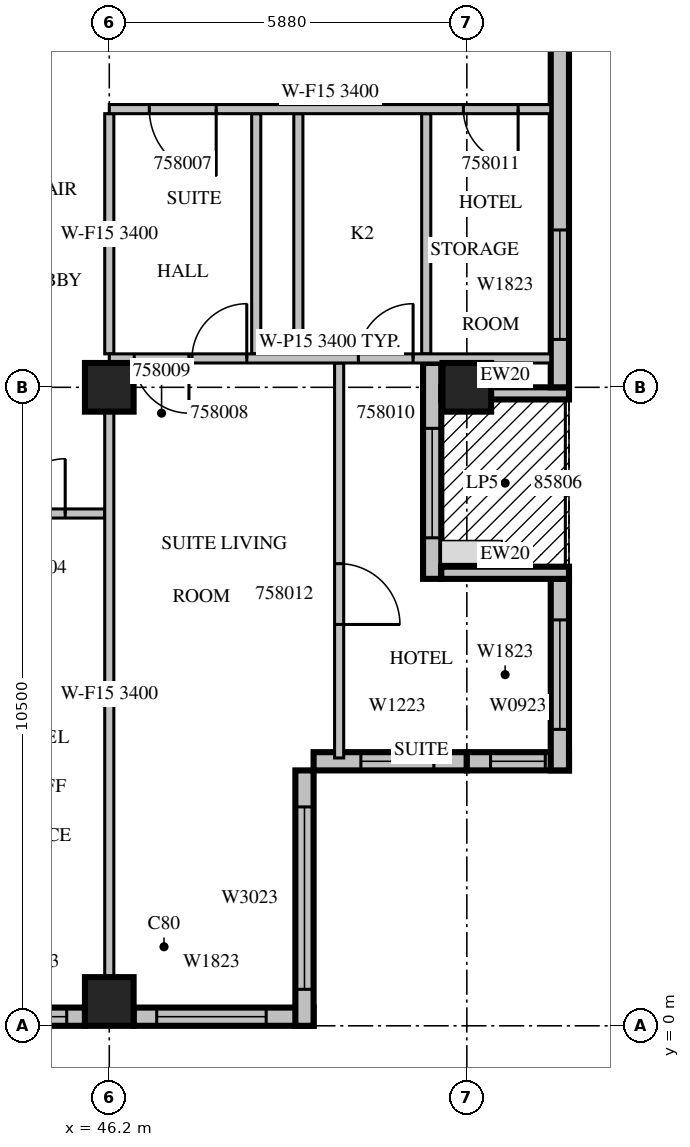
"""IFC4 building model, lengths in metres.
Left out: names, types, materials, properties, quantities, classifications, styles, units other than length and angle.
Written with IfcOpenShell. Run it as: python <this file> out.ifc"""

import sys

from ifc_helpers import new_model, si_unit, direction, frame, frame_2d, origin, origin_2d, place, context, subcontext, project, spatial, rectangle, extrude, source, transform, mapped, element, fill, save


model = new_model("IFC4")
c1 = context("Model", 3, precision=1e-05, world=origin(), true_north=direction((0.0, 1.0)))
c2 = subcontext(c1, "Body", "Model", "MODEL_VIEW")
j1 = project(units=[si_unit("LENGTHUNIT", "METRE"), si_unit("PLANEANGLEUNIT", "RADIAN")], contexts=[c1])
p1 = place(None, origin())
s1 = spatial("IfcSite", under=j1, at=p1, CompositionType="ELEMENT")
p2 = place(p1, origin())
s2 = spatial("IfcBuilding", under=s1, at=p2, CompositionType="ELEMENT")
p3 = place(p2, frame((0.0, 0.0, 253.8)))
s3 = spatial("IfcBuildingStorey", under=s2, at=p3, CompositionType="ELEMENT", Elevation=253.8)
m1 = source(origin(), c2, "Body", "SweptSolid", [
    extrude(rectangle(XDim=0.8, YDim=0.8, at=origin_2d()), origin(), (0.0, 0.0, 1.0), 3.8),
])
for number, where, z_axis, x_axis in (
    (1, (46.2, 0.4, 0.0), (0.0, 0.0, 1.0), (1.0, 0.0, 0.0)),
    (2, (46.2, 10.5, 0.0), (0.0, 0.0, 1.0), (1.0, 0.0, 0.0)),
    (3, (52.08, 10.5, 0.0), (0.0, 0.0, 1.0), (1.0, 0.0, 0.0)),
):
    element("IfcColumn", number, at=place(p3, frame(where, z_axis=z_axis, x_axis=x_axis)), inside=s3, PredefinedType="COLUMN", context=c2, shape_type="MappedRepresentation", body=[
        mapped(m1, transform((0.0, 0.0, 0.0), scale=1.0)),
    ])
m2 = source(origin(), c2, "Body", "SweptSolid", [
    extrude(rectangle(XDim=1.8, YDim=0.3, at=frame_2d((0.9, 0.0))), origin(), (0.0, 0.0, 1.0), 3.4),
])
p4 = place(p3, frame((44.0, 0.15, 0.0), z_axis=(0.0, 0.0, 1.0), x_axis=(1.0, 0.0, 0.0)))
e4 = element("IfcWall", 4, at=p4, inside=s3, PredefinedType="STANDARD", context=c2, shape_type="MappedRepresentation", body=[
    mapped(m2, transform((0.0, 0.0, 0.0), scale=1.0)),
])
m3 = source(origin(), c2, "Body", "SweptSolid", [
    extrude(rectangle(XDim=1.2, YDim=2.3, at=frame_2d((0.6, 1.15))), frame((0.0, 0.16, 0.0), z_axis=(0.0, -1.0, 0.0), x_axis=(1.0, 0.0, 0.0)), (0.0, 0.0, 1.0), 0.32),
])
p5 = place(p4, frame((0.3, 0.0, 0.6)))
e5 = element("IfcOpeningElement", 5, at=p5, cuts=e4, PredefinedType="OPENING", context=c2, shape_type="MappedRepresentation", body=[
    mapped(m3, transform((0.0, 0.0, 0.0), scale=1.0)),
])
m4 = source(origin(), c2, "Body", "SweptSolid", [
    extrude(rectangle(XDim=2.96, YDim=0.3, at=frame_2d((1.48, 0.0))), origin(), (0.0, 0.0, 1.0), 3.4),
])
p6 = place(p3, frame((46.6, 0.15, 0.0), z_axis=(0.0, 0.0, 1.0), x_axis=(1.0, 0.0, 0.0)))
e6 = element("IfcWall", 6, at=p6, inside=s3, PredefinedType="STANDARD", context=c2, shape_type="MappedRepresentation", body=[
    mapped(m4, transform((0.0, 0.0, 0.0), scale=1.0)),
])
m5 = source(origin(), c2, "Body", "SweptSolid", [
    extrude(rectangle(XDim=1.8, YDim=2.3, at=frame_2d((0.9, 1.15))), frame((0.0, 0.16, 0.0), z_axis=(0.0, -1.0, 0.0), x_axis=(1.0, 0.0, 0.0)), (0.0, 0.0, 1.0), 0.32),
])
p7 = place(p6, frame((0.38, 0.0, 0.6)))
e7 = element("IfcOpeningElement", 7, at=p7, cuts=e6, PredefinedType="OPENING", context=c2, shape_type="MappedRepresentation", body=[
    mapped(m5, transform((0.0, 0.0, 0.0), scale=1.0)),
])
m6 = source(origin(), c2, "Body", "SweptSolid", [
    extrude(rectangle(XDim=4.2, YDim=0.3, at=frame_2d((2.1, 0.0))), origin(), (0.0, 0.0, 1.0), 3.4),
])
p8 = place(p3, frame((49.41, 0.0, 0.0), z_axis=(0.0, 0.0, 1.0), x_axis=(0.0, 1.0, 0.0)))
e8 = element("IfcWall", 8, at=p8, inside=s3, PredefinedType="STANDARD", context=c2, shape_type="MappedRepresentation", body=[
    mapped(m6, transform((0.0, 0.0, 0.0), scale=1.0)),
])
m7 = source(origin(), c2, "Body", "SweptSolid", [
    extrude(rectangle(XDim=3.0, YDim=2.3, at=frame_2d((1.5, 1.15))), frame((0.0, 0.16, 0.0), z_axis=(0.0, -1.0, 0.0), x_axis=(1.0, 0.0, 0.0)), (0.0, 0.0, 1.0), 0.32),
])
p9 = place(p8, frame((0.6, 0.0, 0.6)))
e9 = element("IfcOpeningElement", 9, at=p9, cuts=e8, PredefinedType="OPENING", context=c2, shape_type="MappedRepresentation", body=[
    mapped(m7, transform((0.0, 0.0, 0.0), scale=1.0)),
])
m8 = source(origin(), c2, "Body", "SweptSolid", [
    extrude(rectangle(XDim=2.52, YDim=0.3, at=frame_2d((1.26, 0.0))), origin(), (0.0, 0.0, 1.0), 3.4),
])
p10 = place(p3, frame((49.56, 4.35, 0.0), z_axis=(0.0, 0.0, 1.0), x_axis=(1.0, 0.0, 0.0)))
e10 = element("IfcWall", 10, at=p10, inside=s3, PredefinedType="STANDARD", context=c2, shape_type="MappedRepresentation", body=[
    mapped(m8, transform((0.0, 0.0, 0.0), scale=1.0)),
])
p11 = place(p10, frame((0.777, 0.0, 0.6)))
e11 = element("IfcOpeningElement", 11, at=p11, cuts=e10, PredefinedType="OPENING", context=c2, shape_type="MappedRepresentation", body=[
    mapped(m3, transform((0.0, 0.0, 0.0), scale=1.0)),
])
m9 = source(origin(), c2, "Body", "SweptSolid", [
    extrude(rectangle(XDim=1.68, YDim=0.3, at=frame_2d((0.84, 0.0))), origin(), (0.0, 0.0, 1.0), 3.4),
])
p12 = place(p3, frame((52.08, 4.35, 0.0), z_axis=(0.0, 0.0, 1.0), x_axis=(1.0, 0.0, 0.0)))
e12 = element("IfcWall", 12, at=p12, inside=s3, PredefinedType="STANDARD", context=c2, shape_type="MappedRepresentation", body=[
    mapped(m9, transform((0.0, 0.0, 0.0), scale=1.0)),
])
m10 = source(origin(), c2, "Body", "SweptSolid", [
    extrude(rectangle(XDim=0.9, YDim=2.3, at=frame_2d((0.45, 1.15))), frame((0.0, 0.16, 0.0), z_axis=(0.0, -1.0, 0.0), x_axis=(1.0, 0.0, 0.0)), (0.0, 0.0, 1.0), 0.32),
])
p13 = place(p12, frame((0.39, 0.0, 0.6)))
e13 = element("IfcOpeningElement", 13, at=p13, cuts=e12, PredefinedType="OPENING", context=c2, shape_type="MappedRepresentation", body=[
    mapped(m10, transform((0.0, 0.0, 0.0), scale=1.0)),
])
m11 = source(origin(), c2, "Body", "SweptSolid", [
    extrude(rectangle(XDim=3.15, YDim=0.3, at=frame_2d((1.575, 0.0))), origin(), (0.0, 0.0, 1.0), 3.4),
])
p14 = place(p3, frame((53.61, 4.2, 0.0), z_axis=(0.0, 0.0, 1.0), x_axis=(0.0, 1.0, 0.0)))
e14 = element("IfcWall", 14, at=p14, inside=s3, PredefinedType="STANDARD", context=c2, shape_type="MappedRepresentation", body=[
    mapped(m11, transform((0.0, 0.0, 0.0), scale=1.0)),
])
p15 = place(p14, frame((0.675, 0.0, 0.6)))
e15 = element("IfcOpeningElement", 15, at=p15, cuts=e14, PredefinedType="OPENING", context=c2, shape_type="MappedRepresentation", body=[
    mapped(m5, transform((0.0, 0.0, 0.0), scale=1.0)),
])
m12 = source(origin(), c2, "Body", "SweptSolid", [
    extrude(rectangle(XDim=3.55, YDim=0.3, at=frame_2d((1.775, 0.0))), origin(), (0.0, 0.0, 1.0), 3.4),
])
p16 = place(p3, frame((51.51, 7.35, 0.0), z_axis=(0.0, 0.0, 1.0), x_axis=(0.0, 1.0, 0.0)))
e16 = element("IfcWall", 16, at=p16, inside=s3, PredefinedType="STANDARD", context=c2, shape_type="MappedRepresentation", body=[
    mapped(m12, transform((0.0, 0.0, 0.0), scale=1.0)),
])
m13 = source(origin(), c2, "Body", "SweptSolid", [
    extrude(rectangle(XDim=1.8, YDim=2.4, at=frame_2d((0.9, 1.2))), frame((0.0, 0.16, 0.0), z_axis=(0.0, -1.0, 0.0), x_axis=(1.0, 0.0, 0.0)), (0.0, 0.0, 1.0), 0.32),
])
p17 = place(p16, frame((0.675, 0.0, 0.0)))
e17 = element("IfcOpeningElement", 17, at=p17, cuts=e16, PredefinedType="OPENING", context=c2, shape_type="MappedRepresentation", body=[
    mapped(m13, transform((0.0, 0.0, 0.0), scale=1.0)),
])
m14 = source(origin(), c2, "Body", "SweptSolid", [
    extrude(rectangle(XDim=2.1, YDim=0.2, at=frame_2d((1.05, 0.0))), origin(), (0.0, 0.0, 1.0), 3.4),
])
for number, where, z_axis, x_axis in (
    (18, (53.76, 7.45, 0.0), (0.0, 0.0, 1.0), (-1.0, 0.0, 0.0)),
    (19, (53.76, 10.4, 0.0), (0.0, 0.0, 1.0), (-1.0, 0.0, 0.0)),
):
    element("IfcWall", number, at=place(p3, frame(where, z_axis=z_axis, x_axis=x_axis)), inside=s3, PredefinedType="STANDARD", context=c2, shape_type="MappedRepresentation", body=[
        mapped(m14, transform((0.0, 0.0, 0.0), scale=1.0)),
    ])
m15 = source(origin(), c2, "Body", "SweptSolid", [
    extrude(rectangle(XDim=6.75, YDim=0.3, at=frame_2d((3.375, 0.0))), origin(), (0.0, 0.0, 1.0), 3.4),
])
p18 = place(p3, frame((53.61, 10.5, 0.0), z_axis=(0.0, 0.0, 1.0), x_axis=(0.0, 1.0, 0.0)))
e20 = element("IfcWall", 20, at=p18, inside=s3, PredefinedType="STANDARD", context=c2, shape_type="MappedRepresentation", body=[
    mapped(m15, transform((0.0, 0.0, 0.0), scale=1.0)),
])
p19 = place(p18, frame((0.787, 0.0, 0.6)))
e21 = element("IfcOpeningElement", 21, at=p19, cuts=e20, PredefinedType="OPENING", context=c2, shape_type="MappedRepresentation", body=[
    mapped(m5, transform((0.0, 0.0, 0.0), scale=1.0)),
])
m16 = source(origin(), c2, "Body", "SweptSolid", [
    extrude(rectangle(XDim=2.2, YDim=0.15, at=frame_2d((1.1, 0.0))), origin(), (0.0, 0.0, 1.0), 3.4),
])
p20 = place(p3, frame((46.125, 8.425, 0.0), z_axis=(0.0, 0.0, 1.0), x_axis=(-1.0, 0.0, 0.0)))
e22 = element("IfcWall", 22, at=p20, inside=s3, PredefinedType="PARTITIONING", context=c2, shape_type="MappedRepresentation", body=[
    mapped(m16, transform((0.0, 0.0, 0.0), scale=1.0)),
])
m17 = source(origin(), c2, "Body", "SweptSolid", [
    extrude(rectangle(XDim=0.9, YDim=2.1, at=frame_2d((0.45, 1.05))), frame((0.0, 0.085, 0.0), z_axis=(0.0, -1.0, 0.0), x_axis=(1.0, 0.0, 0.0)), (0.0, 0.0, 1.0), 0.17),
])
p21 = place(p20, frame((0.65, 0.0, 0.0)))
e23 = element("IfcOpeningElement", 23, at=p21, cuts=e22, PredefinedType="OPENING", context=c2, shape_type="MappedRepresentation", body=[
    mapped(m17, transform((0.0, 0.0, 0.0), scale=1.0)),
])
p22 = place(p3, frame((49.98, 4.405, 0.0), z_axis=(0.0, 0.0, 1.0), x_axis=(0.0, 1.0, 0.0)))
e24 = element("IfcWall", 24, at=p22, inside=s3, PredefinedType="PARTITIONING", context=c2, shape_type="SweptSolid", body=[
    extrude(rectangle(XDim=6.495, YDim=0.15, at=frame_2d((3.248, 0.0))), origin(), (0.0, 0.0, 1.0), 3.4),
])
m18 = source(origin(), c2, "Body", "SweptSolid", [
    extrude(rectangle(XDim=1.0, YDim=2.1, at=frame_2d((0.5, 1.05))), frame((0.0, 0.085, 0.0), z_axis=(0.0, -1.0, 0.0), x_axis=(1.0, 0.0, 0.0)), (0.0, 0.0, 1.0), 0.17),
])
p23 = place(p22, frame((2.195, 0.0, 0.0)))
e25 = element("IfcOpeningElement", 25, at=p23, cuts=e24, PredefinedType="OPENING", context=c2, shape_type="MappedRepresentation", body=[
    mapped(m18, transform((0.0, 0.0, 0.0), scale=1.0)),
])
m19 = source(origin(), c2, "Body", "SweptSolid", [
    extrude(rectangle(XDim=3.95, YDim=0.15, at=frame_2d((1.975, 0.0))), origin(), (0.0, 0.0, 1.0), 3.4),
])
for number, where, z_axis, x_axis in (
    (26, (48.617, 11.05, 0.0), (0.0, 0.0, 1.0), (0.0, 1.0, 0.0)),
    (27, (49.309, 11.05, 0.0), (0.0, 0.0, 1.0), (0.0, 1.0, 0.0)),
    (28, (51.412, 11.05, 0.0), (0.0, 0.0, 1.0), (0.0, 1.0, 0.0)),
):
    element("IfcWall", number, at=place(p3, frame(where, z_axis=z_axis, x_axis=x_axis)), inside=s3, PredefinedType="PARTITIONING", context=c2, shape_type="MappedRepresentation", body=[
        mapped(m19, transform((0.0, 0.0, 0.0), scale=1.0)),
    ])
m20 = source(origin(), c2, "Body", "SweptSolid", [
    extrude(rectangle(XDim=9.302, YDim=0.15, at=frame_2d((4.651, 0.0))), origin(), (0.0, 0.0, 1.0), 3.4),
])
p24 = place(p3, frame((46.2, 0.799, 0.0), z_axis=(0.0, 0.0, 1.0), x_axis=(0.0, 1.0, 0.0)))
e29 = element("IfcWall", 29, at=p24, inside=s3, PredefinedType="PARTITIONING", context=c2, shape_type="MappedRepresentation", body=[
    mapped(m20, transform((0.0, 0.0, 0.0), scale=1.0)),
])
p25 = place(p3, frame((46.2, 11.05, 0.0), z_axis=(0.0, 0.0, 1.0), x_axis=(0.0, 1.0, 0.0)))
e30 = element("IfcWall", 30, at=p25, inside=s3, PredefinedType="PARTITIONING", context=c2, shape_type="MappedRepresentation", body=[
    mapped(m19, transform((0.0, 0.0, 0.0), scale=1.0)),
])
m21 = source(origin(), c2, "Body", "SweptSolid", [
    extrude(rectangle(XDim=7.26, YDim=0.15, at=frame_2d((3.63, 0.0))), origin(), (0.0, 0.0, 1.0), 3.4),
])
p26 = place(p3, frame((53.46, 10.975, 0.0), z_axis=(0.0, 0.0, 1.0), x_axis=(-1.0, 0.0, 0.0)))
e31 = element("IfcWall", 31, at=p26, inside=s3, PredefinedType="PARTITIONING", context=c2, shape_type="MappedRepresentation", body=[
    mapped(m21, transform((0.0, 0.0, 0.0), scale=1.0)),
])
p27 = place(p26, frame((4.999, 0.0, 0.0)))
e32 = element("IfcOpeningElement", 32, at=p27, cuts=e31, PredefinedType="OPENING", context=c2, shape_type="MappedRepresentation", body=[
    mapped(m17, transform((0.0, 0.0, 0.0), scale=1.0)),
])
p28 = place(p26, frame((5.95, 0.0, 0.0)))
e33 = element("IfcOpeningElement", 33, at=p28, cuts=e31, PredefinedType="OPENING", context=c2, shape_type="MappedRepresentation", body=[
    mapped(m17, transform((0.0, 0.0, 0.0), scale=1.0)),
])
p29 = place(p26, frame((2.264, 0.0, 0.0)))
e34 = element("IfcOpeningElement", 34, at=p29, cuts=e31, PredefinedType="OPENING", context=c2, shape_type="MappedRepresentation", body=[
    mapped(m17, transform((0.0, 0.0, 0.0), scale=1.0)),
])
p30 = place(p3, frame((53.46, 15.075, 0.0), z_axis=(0.0, 0.0, 1.0), x_axis=(-1.0, 0.0, 0.0)))
e35 = element("IfcWall", 35, at=p30, inside=s3, PredefinedType="PARTITIONING", context=c2, shape_type="MappedRepresentation", body=[
    mapped(m21, transform((0.0, 0.0, 0.0), scale=1.0)),
])
m22 = source(origin(), c2, "Body", "SweptSolid", [
    extrude(rectangle(XDim=1.1, YDim=2.1, at=frame_2d((0.55, 1.05))), frame((0.0, 0.085, 0.0), z_axis=(0.0, -1.0, 0.0), x_axis=(1.0, 0.0, 0.0)), (0.0, 0.0, 1.0), 0.17),
])
p31 = place(p30, frame((5.502, 0.0, 0.0)))
e36 = element("IfcOpeningElement", 36, at=p31, cuts=e35, PredefinedType="OPENING", context=c2, shape_type="MappedRepresentation", body=[
    mapped(m22, transform((0.0, 0.0, 0.0), scale=1.0)),
])
p32 = place(p30, frame((0.536, 0.0, 0.0)))
e37 = element("IfcOpeningElement", 37, at=p32, cuts=e35, PredefinedType="OPENING", context=c2, shape_type="MappedRepresentation", body=[
    mapped(m17, transform((0.0, 0.0, 0.0), scale=1.0)),
])
m23 = source(origin(), c2, "Body", "SweptSolid", [
    extrude(rectangle(XDim=1.2, YDim=2.3, at=frame_2d((0.6, 1.15))), frame((0.0, 0.03, 0.0), z_axis=(0.0, -1.0, 0.0), x_axis=(1.0, 0.0, 0.0)), (0.0, 0.0, 1.0), 0.06),
])
p33 = place(p5, origin())
e38 = element("IfcWindow", 38, at=p33, inside=s3, PartitioningType="SINGLE_PANEL", PredefinedType="WINDOW", context=c2, shape_type="MappedRepresentation", body=[
    mapped(m23, transform((0.0, 0.0, 0.0), scale=1.0)),
])
fill(e5, e38)
m24 = source(origin(), c2, "Body", "SweptSolid", [
    extrude(rectangle(XDim=1.8, YDim=2.3, at=frame_2d((0.9, 1.15))), frame((0.0, 0.03, 0.0), z_axis=(0.0, -1.0, 0.0), x_axis=(1.0, 0.0, 0.0)), (0.0, 0.0, 1.0), 0.06),
])
p34 = place(p7, origin())
e39 = element("IfcWindow", 39, at=p34, inside=s3, PartitioningType="SINGLE_PANEL", PredefinedType="WINDOW", context=c2, shape_type="MappedRepresentation", body=[
    mapped(m24, transform((0.0, 0.0, 0.0), scale=1.0)),
])
fill(e7, e39)
m25 = source(origin(), c2, "Body", "SweptSolid", [
    extrude(rectangle(XDim=3.0, YDim=2.3, at=frame_2d((1.5, 1.15))), frame((0.0, 0.03, 0.0), z_axis=(0.0, -1.0, 0.0), x_axis=(1.0, 0.0, 0.0)), (0.0, 0.0, 1.0), 0.06),
])
p35 = place(p9, origin())
e40 = element("IfcWindow", 40, at=p35, inside=s3, PartitioningType="SINGLE_PANEL", PredefinedType="WINDOW", context=c2, shape_type="MappedRepresentation", body=[
    mapped(m25, transform((0.0, 0.0, 0.0), scale=1.0)),
])
fill(e9, e40)
p36 = place(p11, origin())
e41 = element("IfcWindow", 41, at=p36, inside=s3, PartitioningType="SINGLE_PANEL", PredefinedType="WINDOW", context=c2, shape_type="MappedRepresentation", body=[
    mapped(m23, transform((0.0, 0.0, 0.0), scale=1.0)),
])
fill(e11, e41)
m26 = source(origin(), c2, "Body", "SweptSolid", [
    extrude(rectangle(XDim=0.9, YDim=2.3, at=frame_2d((0.45, 1.15))), frame((0.0, 0.03, 0.0), z_axis=(0.0, -1.0, 0.0), x_axis=(1.0, 0.0, 0.0)), (0.0, 0.0, 1.0), 0.06),
])
p37 = place(p13, origin())
e42 = element("IfcWindow", 42, at=p37, inside=s3, PartitioningType="SINGLE_PANEL", PredefinedType="WINDOW", context=c2, shape_type="MappedRepresentation", body=[
    mapped(m26, transform((0.0, 0.0, 0.0), scale=1.0)),
])
fill(e13, e42)
p38 = place(p15, origin())
e43 = element("IfcWindow", 43, at=p38, inside=s3, PartitioningType="SINGLE_PANEL", PredefinedType="WINDOW", context=c2, shape_type="MappedRepresentation", body=[
    mapped(m24, transform((0.0, 0.0, 0.0), scale=1.0)),
])
fill(e15, e43)
m27 = source(origin(), c2, "Body", "SweptSolid", [
    extrude(rectangle(XDim=1.8, YDim=2.4, at=frame_2d((0.9, 1.2))), frame((0.0, 0.025, 0.0), z_axis=(0.0, -1.0, 0.0), x_axis=(1.0, 0.0, 0.0)), (0.0, 0.0, 1.0), 0.05),
])
p39 = place(p17, origin())
e44 = element("IfcDoor", 44, at=p39, inside=s3, OperationType="SLIDING_TO_LEFT", PredefinedType="DOOR", context=c2, shape_type="MappedRepresentation", body=[
    mapped(m27, transform((0.0, 0.0, 0.0), scale=1.0)),
])
fill(e17, e44)
p40 = place(p19, origin())
e45 = element("IfcWindow", 45, at=p40, inside=s3, PartitioningType="SINGLE_PANEL", PredefinedType="WINDOW", context=c2, shape_type="MappedRepresentation", body=[
    mapped(m24, transform((0.0, 0.0, 0.0), scale=1.0)),
])
fill(e21, e45)
m28 = source(origin(), c2, "Body", "SweptSolid", [
    extrude(rectangle(XDim=0.9, YDim=2.1, at=frame_2d((0.45, 1.05))), frame((0.0, 0.025, 0.0), z_axis=(0.0, -1.0, 0.0), x_axis=(1.0, 0.0, 0.0)), (0.0, 0.0, 1.0), 0.05),
])
p41 = place(p21, origin())
e46 = element("IfcDoor", 46, at=p41, inside=s3, OperationType="SINGLE_SWING_RIGHT", PredefinedType="DOOR", context=c2, shape_type="MappedRepresentation", body=[
    mapped(m28, transform((0.0, 0.0, 0.0), scale=1.0)),
])
fill(e23, e46)
m29 = source(origin(), c2, "Body", "SweptSolid", [
    extrude(rectangle(XDim=1.1, YDim=2.1, at=frame_2d((0.55, 1.05))), frame((0.0, 0.025, 0.0), z_axis=(0.0, -1.0, 0.0), x_axis=(1.0, 0.0, 0.0)), (0.0, 0.0, 1.0), 0.05),
])
p42 = place(p31, origin())
e47 = element("IfcDoor", 47, at=p42, inside=s3, OperationType="SINGLE_SWING_LEFT", PredefinedType="DOOR", context=c2, shape_type="MappedRepresentation", body=[
    mapped(m29, transform((0.0, 0.0, 0.0), scale=1.0)),
])
fill(e36, e47)
p43 = place(p27, origin())
e48 = element("IfcDoor", 48, at=p43, inside=s3, OperationType="SINGLE_SWING_RIGHT", PredefinedType="DOOR", context=c2, shape_type="MappedRepresentation", body=[
    mapped(m28, transform((0.0, 0.0, 0.0), scale=1.0)),
])
fill(e32, e48)
p44 = place(p28, origin())
e49 = element("IfcDoor", 49, at=p44, inside=s3, OperationType="SINGLE_SWING_LEFT", PredefinedType="DOOR", context=c2, shape_type="MappedRepresentation", body=[
    mapped(m28, transform((0.0, 0.0, 0.0), scale=1.0)),
])
fill(e33, e49)
p45 = place(p29, origin())
e50 = element("IfcDoor", 50, at=p45, inside=s3, OperationType="SINGLE_SWING_RIGHT", PredefinedType="DOOR", context=c2, shape_type="MappedRepresentation", body=[
    mapped(m28, transform((0.0, 0.0, 0.0), scale=1.0)),
])
fill(e34, e50)
p46 = place(p32, origin())
e51 = element("IfcDoor", 51, at=p46, inside=s3, OperationType="SINGLE_SWING_LEFT", PredefinedType="DOOR", context=c2, shape_type="MappedRepresentation", body=[
    mapped(m28, transform((0.0, 0.0, 0.0), scale=1.0)),
])
fill(e37, e51)
m30 = source(origin(), c2, "Body", "SweptSolid", [
    extrude(rectangle(XDim=1.0, YDim=2.1, at=frame_2d((0.5, 1.05))), frame((0.0, 0.025, 0.0), z_axis=(0.0, -1.0, 0.0), x_axis=(1.0, 0.0, 0.0)), (0.0, 0.0, 1.0), 0.05),
])
p47 = place(p23, origin())
e52 = element("IfcDoor", 52, at=p47, inside=s3, OperationType="SINGLE_SWING_RIGHT", PredefinedType="DOOR", context=c2, shape_type="MappedRepresentation", body=[
    mapped(m30, transform((0.0, 0.0, 0.0), scale=1.0)),
])
fill(e25, e52)
save(model, sys.argv[1])
